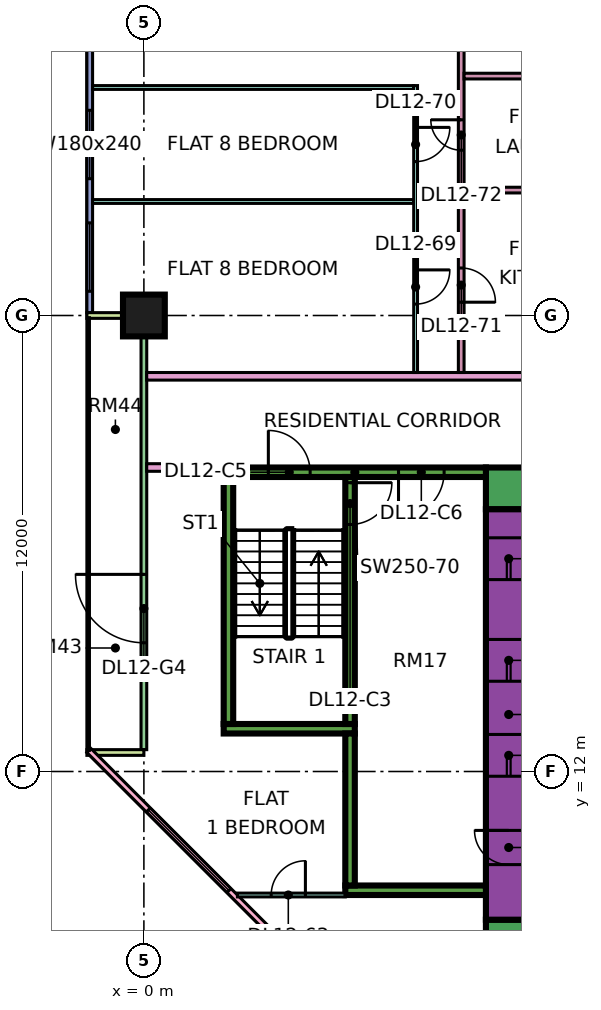
"""IFC4 building model, lengths in metres.
Left out: names, types, materials, properties, quantities, classifications, styles, units other than length and angle.
Written with IfcOpenShell. Run it as: python <this file> out.ifc"""

import sys

from ifc_helpers import new_model, si_unit, direction, frame, frame_2d, origin, origin_2d, place, context, subcontext, project, spatial, rectangle, extrude, element, fill, save


model = new_model("IFC4")
c1 = context("Model", 3, precision=1e-05, world=origin(), true_north=direction((0.0, 1.0)))
c2 = subcontext(c1, "Body", "Model", "MODEL_VIEW")
j1 = project(units=[si_unit("LENGTHUNIT", "METRE"), si_unit("PLANEANGLEUNIT", "RADIAN")], contexts=[c1])
p1 = place(None, origin())
s1 = spatial("IfcSite", under=j1, at=p1, CompositionType="ELEMENT")
p2 = place(p1, origin())
s2 = spatial("IfcBuilding", under=s1, at=p2, CompositionType="ELEMENT")
p3 = place(p2, frame((0.0, 0.0, 60.15)))
s3 = spatial("IfcBuildingStorey", under=s2, at=p3, CompositionType="ELEMENT", Elevation=60.15)
p4 = place(p3, frame((0.0, 24.0, 0.0), z_axis=(0.0, 0.0, 1.0), x_axis=(1.0, 0.0, 0.0)))
e1 = element("IfcColumn", 1, at=p4, inside=s3, PredefinedType="COLUMN", context=c2, shape_type="SweptSolid", body=[
    extrude(rectangle(XDim=1.1, YDim=1.1, at=origin_2d()), origin(), (0.0, 0.0, 1.0), 3.75),
])
p5 = place(p3, frame((9.0, 7.55, 0.0), z_axis=(0.0, 0.0, 1.0), x_axis=(1.0, 0.0, 0.0)))
e2 = element("IfcWall", 2, at=p5, inside=s3, PredefinedType="SHEAR", context=c2, shape_type="SweptSolid", body=[
    extrude(rectangle(XDim=25.0, YDim=1.1, at=frame_2d((12.5, 0.0))), origin(), (0.0, 0.0, 1.0), 3.75),
])
p6 = place(p3, frame((9.0, 19.45, 0.0), z_axis=(0.0, 0.0, 1.0), x_axis=(1.0, 0.0, 0.0)))
e3 = element("IfcWall", 3, at=p6, inside=s3, PredefinedType="SHEAR", context=c2, shape_type="SweptSolid", body=[
    extrude(rectangle(XDim=25.0, YDim=1.1, at=frame_2d((12.5, 0.0))), origin(), (0.0, 0.0, 1.0), 3.75),
])
p7 = place(p6, frame((19.1, 0.0, 0.0)))
e4 = element("IfcOpeningElement", 4, at=p7, cuts=e3, PredefinedType="OPENING", context=c2, shape_type="SweptSolid", body=[
    extrude(rectangle(XDim=1.8, YDim=2.4, at=frame_2d((0.9, 1.2))), frame((0.0, 0.56, 0.0), z_axis=(0.0, -1.0, 0.0), x_axis=(1.0, 0.0, 0.0)), (0.0, 0.0, 1.0), 1.12),
])
p8 = place(p3, frame((9.6, 8.1, 0.0), z_axis=(0.0, 0.0, 1.0), x_axis=(0.0, 1.0, 0.0)))
e5 = element("IfcWall", 5, at=p8, inside=s3, PredefinedType="SHEAR", context=c2, shape_type="SweptSolid", body=[
    extrude(rectangle(XDim=10.8, YDim=1.2, at=frame_2d((5.4, 0.0))), origin(), (0.0, 0.0, 1.0), 3.75),
])
p9 = place(p8, frame((3.775, 0.0, 0.0)))
e6 = element("IfcOpeningElement", 6, at=p9, cuts=e5, PredefinedType="OPENING", context=c2, shape_type="SweptSolid", body=[
    extrude(rectangle(XDim=1.1, YDim=2.2, at=frame_2d((0.55, 1.1))), frame((0.0, 0.61, 0.0), z_axis=(0.0, -1.0, 0.0), x_axis=(1.0, 0.0, 0.0)), (0.0, 0.0, 1.0), 1.22),
])
p10 = place(p8, frame((6.275, 0.0, 0.0)))
e7 = element("IfcOpeningElement", 7, at=p10, cuts=e5, PredefinedType="OPENING", context=c2, shape_type="SweptSolid", body=[
    extrude(rectangle(XDim=1.1, YDim=2.2, at=frame_2d((0.55, 1.1))), frame((0.0, 0.61, 0.0), z_axis=(0.0, -1.0, 0.0), x_axis=(1.0, 0.0, 0.0)), (0.0, 0.0, 1.0), 1.22),
])
p11 = place(p8, frame((8.95, 0.0, 0.0)))
e8 = element("IfcOpeningElement", 8, at=p11, cuts=e5, PredefinedType="OPENING", context=c2, shape_type="SweptSolid", body=[
    extrude(rectangle(XDim=1.1, YDim=2.2, at=frame_2d((0.55, 1.1))), frame((0.0, 0.61, 0.0), z_axis=(0.0, -1.0, 0.0), x_axis=(1.0, 0.0, 0.0)), (0.0, 0.0, 1.0), 1.22),
])
p12 = place(p8, frame((1.45, 0.0, 0.0)))
e9 = element("IfcOpeningElement", 9, at=p12, cuts=e5, PredefinedType="OPENING", context=c2, shape_type="SweptSolid", body=[
    extrude(rectangle(XDim=0.9, YDim=2.1, at=frame_2d((0.45, 1.05))), frame((0.0, 0.61, 0.0), z_axis=(0.0, -1.0, 0.0), x_axis=(1.0, 0.0, 0.0)), (0.0, 0.0, 1.0), 1.22),
])
p13 = place(p3, frame((2.1, 19.875, 0.0), z_axis=(0.0, 0.0, 1.0), x_axis=(1.0, 0.0, 0.0)))
e10 = element("IfcWall", 10, at=p13, inside=s3, PredefinedType="SHEAR", context=c2, shape_type="SweptSolid", body=[
    extrude(rectangle(XDim=6.9, YDim=0.25, at=frame_2d((3.45, 0.0))), origin(), (0.0, 0.0, 1.0), 3.75),
])
p14 = place(p13, frame((1.175, 0.0, 0.0)))
e11 = element("IfcOpeningElement", 11, at=p14, cuts=e10, PredefinedType="OPENING", context=c2, shape_type="SweptSolid", body=[
    extrude(rectangle(XDim=1.1, YDim=2.2, at=frame_2d((0.55, 1.1))), frame((0.0, 0.135, 0.0), z_axis=(0.0, -1.0, 0.0), x_axis=(1.0, 0.0, 0.0)), (0.0, 0.0, 1.0), 0.27),
])
p15 = place(p13, frame((4.6, 0.0, 0.0)))
e12 = element("IfcOpeningElement", 12, at=p15, cuts=e10, PredefinedType="OPENING", context=c2, shape_type="SweptSolid", body=[
    extrude(rectangle(XDim=1.2, YDim=2.2, at=frame_2d((0.6, 1.1))), frame((0.0, 0.135, 0.0), z_axis=(0.0, -1.0, 0.0), x_axis=(1.0, 0.0, 0.0)), (0.0, 0.0, 1.0), 0.27),
])
p16 = place(p3, frame((2.1, 13.125, 0.0), z_axis=(0.0, 0.0, 1.0), x_axis=(1.0, 0.0, 0.0)))
e13 = element("IfcWall", 13, at=p16, inside=s3, PredefinedType="SHEAR", context=c2, shape_type="SweptSolid", body=[
    extrude(rectangle(XDim=3.45, YDim=0.25, at=frame_2d((1.725, 0.0))), origin(), (0.0, 0.0, 1.0), 3.75),
])
p17 = place(p3, frame((2.225, 13.25, 0.0), z_axis=(0.0, 0.0, 1.0), x_axis=(0.0, 1.0, 0.0)))
e14 = element("IfcWall", 14, at=p17, inside=s3, PredefinedType="SHEAR", context=c2, shape_type="SweptSolid", body=[
    extrude(rectangle(XDim=6.5, YDim=0.25, at=frame_2d((3.25, 0.0))), origin(), (0.0, 0.0, 1.0), 3.75),
])
p18 = place(p3, frame((5.425, 13.25, 0.0), z_axis=(0.0, 0.0, 1.0), x_axis=(0.0, 1.0, 0.0)))
e15 = element("IfcWall", 15, at=p18, inside=s3, PredefinedType="SHEAR", context=c2, shape_type="SweptSolid", body=[
    extrude(rectangle(XDim=6.5, YDim=0.25, at=frame_2d((3.25, 0.0))), origin(), (0.0, 0.0, 1.0), 3.75),
])
p19 = place(p18, frame((5.25, 0.0, 0.0)))
e16 = element("IfcOpeningElement", 16, at=p19, cuts=e15, PredefinedType="OPENING", context=c2, shape_type="SweptSolid", body=[
    extrude(rectangle(XDim=1.1, YDim=2.2, at=frame_2d((0.55, 1.1))), frame((0.0, 0.135, 0.0), z_axis=(0.0, -1.0, 0.0), x_axis=(1.0, 0.0, 0.0)), (0.0, 0.0, 1.0), 0.27),
])
p20 = place(p3, frame((5.3, 8.875, 0.0), z_axis=(0.0, 0.0, 1.0), x_axis=(1.0, 0.0, 0.0)))
e17 = element("IfcWall", 17, at=p20, inside=s3, PredefinedType="SHEAR", context=c2, shape_type="SweptSolid", body=[
    extrude(rectangle(XDim=3.7, YDim=0.25, at=frame_2d((1.85, 0.0))), origin(), (0.0, 0.0, 1.0), 3.75),
])
p21 = place(p3, frame((5.425, 9.0, 0.0), z_axis=(0.0, 0.0, 1.0), x_axis=(0.0, 1.0, 0.0)))
e18 = element("IfcWall", 18, at=p21, inside=s3, PredefinedType="SHEAR", context=c2, shape_type="SweptSolid", body=[
    extrude(rectangle(XDim=4.0, YDim=0.25, at=frame_2d((2.0, 0.0))), origin(), (0.0, 0.0, 1.0), 3.75),
])
p22 = place(p3, frame((-1.425, 35.925, 0.0), z_axis=(0.0, 0.0, 1.0), x_axis=(0.0, -1.0, 0.0)))
e19 = element("IfcWall", 19, at=p22, inside=s3, PredefinedType="SOLIDWALL", context=c2, shape_type="SweptSolid", body=[
    extrude(rectangle(XDim=11.85, YDim=0.15, at=frame_2d((5.925, 0.0))), origin(), (0.0, 0.0, 1.0), 3.35),
])
p23 = place(p22, frame((1.462, 0.0, 0.45)))
e20 = element("IfcOpeningElement", 20, at=p23, cuts=e19, PredefinedType="OPENING", context=c2, shape_type="SweptSolid", body=[
    extrude(rectangle(XDim=3.0, YDim=2.4, at=frame_2d((1.5, 1.2))), frame((0.0, 0.085, 0.0), z_axis=(0.0, -1.0, 0.0), x_axis=(1.0, 0.0, 0.0)), (0.0, 0.0, 1.0), 0.17),
])
p24 = place(p22, frame((6.525, 0.0, 0.45)))
e21 = element("IfcOpeningElement", 21, at=p24, cuts=e19, PredefinedType="OPENING", context=c2, shape_type="SweptSolid", body=[
    extrude(rectangle(XDim=1.8, YDim=2.4, at=frame_2d((0.9, 1.2))), frame((0.0, 0.085, 0.0), z_axis=(0.0, -1.0, 0.0), x_axis=(1.0, 0.0, 0.0)), (0.0, 0.0, 1.0), 0.17),
])
p25 = place(p22, frame((9.488, 0.0, 0.45)))
e22 = element("IfcOpeningElement", 22, at=p25, cuts=e19, PredefinedType="OPENING", context=c2, shape_type="SweptSolid", body=[
    extrude(rectangle(XDim=1.8, YDim=2.4, at=frame_2d((0.9, 1.2))), frame((0.0, 0.085, 0.0), z_axis=(0.0, -1.0, 0.0), x_axis=(1.0, 0.0, 0.0)), (0.0, 0.0, 1.0), 0.17),
])
p26 = place(p3, frame((0.0, 23.925, 0.0), z_axis=(0.0, 0.0, 1.0), x_axis=(0.0, -1.0, 0.0)))
e23 = element("IfcWall", 23, at=p26, inside=s3, PredefinedType="SOLIDWALL", context=c2, shape_type="SweptSolid", body=[
    extrude(rectangle(XDim=11.35, YDim=0.15, at=frame_2d((5.675, 0.0))), origin(), (0.0, 0.0, 1.0), 3.35),
])
p27 = place(p26, frame((6.738, 0.0, 0.0)))
e24 = element("IfcOpeningElement", 24, at=p27, cuts=e23, PredefinedType="OPENING", context=c2, shape_type="SweptSolid", body=[
    extrude(rectangle(XDim=1.8, YDim=2.4, at=frame_2d((0.9, 1.2))), frame((0.0, 0.085, 0.0), z_axis=(0.0, -1.0, 0.0), x_axis=(1.0, 0.0, 0.0)), (0.0, 0.0, 1.0), 0.17),
])
for number, where, z_axis, x_axis in (
    (25, (-1.5, 24.0, 0.0), (0.0, 0.0, 1.0), (1.0, 0.0, 0.0)),
    (26, (-1.5, 12.5, 0.0), (0.0, 0.0, 1.0), (1.0, 0.0, 0.0)),
):
    element("IfcWall", number, at=place(p3, frame(where, z_axis=z_axis, x_axis=x_axis)), inside=s3, PredefinedType="SOLIDWALL", context=c2, shape_type="SweptSolid", body=[
        extrude(rectangle(XDim=1.5, YDim=0.15, at=frame_2d((0.75, 0.0))), origin(), (0.0, 0.0, 1.0), 3.35),
    ])
p28 = place(p3, frame((-1.447, 12.553, 0.0), z_axis=(0.0, 0.0, 1.0), x_axis=(0.707106781187, -0.707106781187, 0.0)))
e27 = element("IfcWall", 27, at=p28, inside=s3, PredefinedType="SOLIDWALL", context=c2, shape_type="SweptSolid", body=[
    extrude(rectangle(XDim=19.799, YDim=0.15, at=frame_2d((9.899, 0.0))), origin(), (0.0, 0.0, 1.0), 3.35),
])
p29 = place(p28, frame((2.212, 0.0, 0.45)))
e28 = element("IfcOpeningElement", 28, at=p29, cuts=e27, PredefinedType="OPENING", context=c2, shape_type="SweptSolid", body=[
    extrude(rectangle(XDim=3.0, YDim=2.4, at=frame_2d((1.5, 1.2))), frame((0.0, 0.085, 0.0), z_axis=(0.0, -1.0, 0.0), x_axis=(1.0, 0.0, 0.0)), (0.0, 0.0, 1.0), 0.17),
])
p30 = place(p28, frame((10.216, 0.0, 0.45)))
e29 = element("IfcOpeningElement", 29, at=p30, cuts=e27, PredefinedType="OPENING", context=c2, shape_type="SweptSolid", body=[
    extrude(rectangle(XDim=3.0, YDim=2.4, at=frame_2d((1.5, 1.2))), frame((0.0, 0.085, 0.0), z_axis=(0.0, -1.0, 0.0), x_axis=(1.0, 0.0, 0.0)), (0.0, 0.0, 1.0), 0.17),
])
p31 = place(p3, frame((-1.351, 27.0, 0.0), z_axis=(0.0, 0.0, 1.0), x_axis=(1.0, 0.0, 0.0)))
e30 = element("IfcWall", 30, at=p31, inside=s3, PredefinedType="PARTITIONING", context=c2, shape_type="SweptSolid", body=[
    extrude(rectangle(XDim=8.451, YDim=0.1, at=frame_2d((4.226, 0.0))), origin(), (0.0, 0.0, 1.0), 3.35),
])
p32 = place(p3, frame((-1.35, 30.0, 0.0), z_axis=(0.0, 0.0, 1.0), x_axis=(1.0, 0.0, 0.0)))
e31 = element("IfcWall", 31, at=p32, inside=s3, PredefinedType="PARTITIONING", context=c2, shape_type="SweptSolid", body=[
    extrude(rectangle(XDim=8.45, YDim=0.1, at=frame_2d((4.225, 0.0))), origin(), (0.0, 0.0, 1.0), 3.35),
])
p33 = place(p3, frame((0.074, 20.0, 0.0), z_axis=(0.0, 0.0, 1.0), x_axis=(1.0, 0.0, 0.0)))
e32 = element("IfcWall", 32, at=p33, inside=s3, PredefinedType="PARTITIONING", context=c2, shape_type="SweptSolid", body=[
    extrude(rectangle(XDim=2.026, YDim=0.2, at=frame_2d((1.013, 0.0))), origin(), (0.0, 0.0, 1.0), 3.35),
])
p34 = place(p3, frame((0.074, 22.4, 0.0), z_axis=(0.0, 0.0, 1.0), x_axis=(1.0, 0.0, 0.0)))
e33 = element("IfcWall", 33, at=p34, inside=s3, PredefinedType="PARTITIONING", context=c2, shape_type="SweptSolid", body=[
    extrude(rectangle(XDim=12.376, YDim=0.2, at=frame_2d((6.188, 0.0))), origin(), (0.0, 0.0, 1.0), 3.35),
])
p35 = place(p3, frame((2.461, 8.75, 0.0), z_axis=(0.0, 0.0, 1.0), x_axis=(1.0, 0.0, 0.0)))
e34 = element("IfcWall", 34, at=p35, inside=s3, PredefinedType="PARTITIONING", context=c2, shape_type="SweptSolid", body=[
    extrude(rectangle(XDim=2.839, YDim=0.1, at=frame_2d((1.419, 0.0))), origin(), (0.0, 0.0, 1.0), 3.35),
])
p36 = place(p35, frame((0.889, 0.0, 0.0)))
e35 = element("IfcOpeningElement", 35, at=p36, cuts=e34, PredefinedType="OPENING", context=c2, shape_type="SweptSolid", body=[
    extrude(rectangle(XDim=0.9, YDim=2.1, at=frame_2d((0.45, 1.05))), frame((0.0, 0.06, 0.0), z_axis=(0.0, -1.0, 0.0), x_axis=(1.0, 0.0, 0.0)), (0.0, 0.0, 1.0), 0.12),
])
p37 = place(p3, frame((7.15, 22.5, 0.0), z_axis=(0.0, 0.0, 1.0), x_axis=(0.0, 1.0, 0.0)))
e36 = element("IfcWall", 36, at=p37, inside=s3, PredefinedType="PARTITIONING", context=c2, shape_type="SweptSolid", body=[
    extrude(rectangle(XDim=7.55, YDim=0.1, at=frame_2d((3.775, 0.0))), origin(), (0.0, 0.0, 1.0), 3.35),
])
p38 = place(p37, frame((1.8, 0.0, 0.0)))
e37 = element("IfcOpeningElement", 37, at=p38, cuts=e36, PredefinedType="OPENING", context=c2, shape_type="SweptSolid", body=[
    extrude(rectangle(XDim=0.9, YDim=2.1, at=frame_2d((0.45, 1.05))), frame((0.0, 0.06, 0.0), z_axis=(0.0, -1.0, 0.0), x_axis=(1.0, 0.0, 0.0)), (0.0, 0.0, 1.0), 0.12),
])
p39 = place(p37, frame((5.55, 0.0, 0.0)))
e38 = element("IfcOpeningElement", 38, at=p39, cuts=e36, PredefinedType="OPENING", context=c2, shape_type="SweptSolid", body=[
    extrude(rectangle(XDim=0.9, YDim=2.1, at=frame_2d((0.45, 1.05))), frame((0.0, 0.06, 0.0), z_axis=(0.0, -1.0, 0.0), x_axis=(1.0, 0.0, 0.0)), (0.0, 0.0, 1.0), 0.12),
])
p40 = place(p3, frame((8.35, 22.5, 0.0), z_axis=(0.0, 0.0, 1.0), x_axis=(0.0, 1.0, 0.0)))
e39 = element("IfcWall", 39, at=p40, inside=s3, PredefinedType="PARTITIONING", context=c2, shape_type="SweptSolid", body=[
    extrude(rectangle(XDim=10.875, YDim=0.15, at=frame_2d((5.438, 0.0))), origin(), (0.0, 0.0, 1.0), 3.35),
])
p41 = place(p40, frame((8.85, 0.0, 0.0)))
e40 = element("IfcOpeningElement", 40, at=p41, cuts=e39, PredefinedType="OPENING", context=c2, shape_type="SweptSolid", body=[
    extrude(rectangle(XDim=0.8, YDim=2.1, at=frame_2d((0.4, 1.05))), frame((0.0, 0.085, 0.0), z_axis=(0.0, -1.0, 0.0), x_axis=(1.0, 0.0, 0.0)), (0.0, 0.0, 1.0), 0.17),
])
p42 = place(p40, frame((1.85, 0.0, 0.0)))
e41 = element("IfcOpeningElement", 41, at=p42, cuts=e39, PredefinedType="OPENING", context=c2, shape_type="SweptSolid", body=[
    extrude(rectangle(XDim=0.9, YDim=2.1, at=frame_2d((0.45, 1.05))), frame((0.0, 0.085, 0.0), z_axis=(0.0, -1.0, 0.0), x_axis=(1.0, 0.0, 0.0)), (0.0, 0.0, 1.0), 0.17),
])
p43 = place(p40, frame((5.85, 0.0, 0.0)))
e42 = element("IfcOpeningElement", 42, at=p43, cuts=e39, PredefinedType="OPENING", context=c2, shape_type="SweptSolid", body=[
    extrude(rectangle(XDim=0.8, YDim=2.1, at=frame_2d((0.4, 1.05))), frame((0.0, 0.085, 0.0), z_axis=(0.0, -1.0, 0.0), x_axis=(1.0, 0.0, 0.0)), (0.0, 0.0, 1.0), 0.17),
])
for number, where, z_axis, x_axis in (
    (43, (8.425, 27.3, 0.0), (0.0, 0.0, 1.0), (1.0, 0.0, 0.0)),
    (44, (8.425, 30.3, 0.0), (0.0, 0.0, 1.0), (1.0, 0.0, 0.0)),
):
    element("IfcWall", number, at=place(p3, frame(where, z_axis=z_axis, x_axis=x_axis)), inside=s3, PredefinedType="PARTITIONING", context=c2, shape_type="SweptSolid", body=[
        extrude(rectangle(XDim=4.025, YDim=0.15, at=frame_2d((2.012, 0.0))), origin(), (0.0, 0.0, 1.0), 3.35),
    ])
p44 = place(p24, origin())
e45 = element("IfcWindow", 45, at=p44, inside=s3, PartitioningType="SINGLE_PANEL", PredefinedType="WINDOW", context=c2, shape_type="SweptSolid", body=[
    extrude(rectangle(XDim=1.8, YDim=2.4, at=frame_2d((0.9, 1.2))), frame((0.0, 0.03, 0.0), z_axis=(0.0, -1.0, 0.0), x_axis=(1.0, 0.0, 0.0)), (0.0, 0.0, 1.0), 0.06),
])
fill(e21, e45)
p45 = place(p25, origin())
e46 = element("IfcWindow", 46, at=p45, inside=s3, PartitioningType="SINGLE_PANEL", PredefinedType="WINDOW", context=c2, shape_type="SweptSolid", body=[
    extrude(rectangle(XDim=1.8, YDim=2.4, at=frame_2d((0.9, 1.2))), frame((0.0, 0.03, 0.0), z_axis=(0.0, -1.0, 0.0), x_axis=(1.0, 0.0, 0.0)), (0.0, 0.0, 1.0), 0.06),
])
fill(e22, e46)
p46 = place(p27, frame((1.8, 0.0, 0.0), z_axis=(0.0, 0.0, 1.0), x_axis=(-1.0, 0.0, 0.0)))
e47 = element("IfcDoor", 47, at=p46, inside=s3, OperationType="DOUBLE_DOOR_SINGLE_SWING", PredefinedType="DOOR", context=c2, shape_type="SweptSolid", body=[
    extrude(rectangle(XDim=1.8, YDim=2.4, at=frame_2d((0.9, 1.2))), frame((0.0, 0.025, 0.0), z_axis=(0.0, -1.0, 0.0), x_axis=(1.0, 0.0, 0.0)), (0.0, 0.0, 1.0), 0.05),
])
fill(e24, e47)
p47 = place(p29, origin())
e48 = element("IfcWindow", 48, at=p47, inside=s3, PartitioningType="SINGLE_PANEL", PredefinedType="WINDOW", context=c2, shape_type="SweptSolid", body=[
    extrude(rectangle(XDim=3.0, YDim=2.4, at=frame_2d((1.5, 1.2))), frame((0.0, 0.03, 0.0), z_axis=(0.0, -1.0, 0.0), x_axis=(1.0, 0.0, 0.0)), (0.0, 0.0, 1.0), 0.06),
])
fill(e28, e48)
p48 = place(p9, origin())
e49 = element("IfcDoor", 49, at=p48, inside=s3, OperationType="DOUBLE_DOOR_SLIDING", PredefinedType="DOOR", context=c2, shape_type="SweptSolid", body=[
    extrude(rectangle(XDim=1.1, YDim=2.2, at=frame_2d((0.55, 1.1))), frame((0.0, 0.025, 0.0), z_axis=(0.0, -1.0, 0.0), x_axis=(1.0, 0.0, 0.0)), (0.0, 0.0, 1.0), 0.05),
])
fill(e6, e49)
p49 = place(p10, origin())
e50 = element("IfcDoor", 50, at=p49, inside=s3, OperationType="DOUBLE_DOOR_SLIDING", PredefinedType="DOOR", context=c2, shape_type="SweptSolid", body=[
    extrude(rectangle(XDim=1.1, YDim=2.2, at=frame_2d((0.55, 1.1))), frame((0.0, 0.025, 0.0), z_axis=(0.0, -1.0, 0.0), x_axis=(1.0, 0.0, 0.0)), (0.0, 0.0, 1.0), 0.05),
])
fill(e7, e50)
p50 = place(p11, origin())
e51 = element("IfcDoor", 51, at=p50, inside=s3, OperationType="DOUBLE_DOOR_SLIDING", PredefinedType="DOOR", context=c2, shape_type="SweptSolid", body=[
    extrude(rectangle(XDim=1.1, YDim=2.2, at=frame_2d((0.55, 1.1))), frame((0.0, 0.025, 0.0), z_axis=(0.0, -1.0, 0.0), x_axis=(1.0, 0.0, 0.0)), (0.0, 0.0, 1.0), 0.05),
])
fill(e8, e51)
p51 = place(p19, origin())
e52 = element("IfcDoor", 52, at=p51, inside=s3, OperationType="SINGLE_SWING_RIGHT", PredefinedType="DOOR", context=c2, shape_type="SweptSolid", body=[
    extrude(rectangle(XDim=1.1, YDim=2.2, at=frame_2d((0.55, 1.1))), frame((0.0, 0.025, 0.0), z_axis=(0.0, -1.0, 0.0), x_axis=(1.0, 0.0, 0.0)), (0.0, 0.0, 1.0), 0.05),
])
fill(e16, e52)
p52 = place(p12, frame((0.9, 0.0, 0.0), z_axis=(0.0, 0.0, 1.0), x_axis=(-1.0, 0.0, 0.0)))
e53 = element("IfcDoor", 53, at=p52, inside=s3, OperationType="SINGLE_SWING_RIGHT", PredefinedType="DOOR", context=c2, shape_type="SweptSolid", body=[
    extrude(rectangle(XDim=0.9, YDim=2.1, at=frame_2d((0.45, 1.05))), frame((0.0, 0.025, 0.0), z_axis=(0.0, -1.0, 0.0), x_axis=(1.0, 0.0, 0.0)), (0.0, 0.0, 1.0), 0.05),
])
fill(e9, e53)
p53 = place(p14, origin())
e54 = element("IfcDoor", 54, at=p53, inside=s3, OperationType="SINGLE_SWING_LEFT", PredefinedType="DOOR", context=c2, shape_type="SweptSolid", body=[
    extrude(rectangle(XDim=1.1, YDim=2.2, at=frame_2d((0.55, 1.1))), frame((0.0, 0.025, 0.0), z_axis=(0.0, -1.0, 0.0), x_axis=(1.0, 0.0, 0.0)), (0.0, 0.0, 1.0), 0.05),
])
fill(e11, e54)
p54 = place(p15, frame((1.2, 0.0, 0.0), z_axis=(0.0, 0.0, 1.0), x_axis=(-1.0, 0.0, 0.0)))
e55 = element("IfcDoor", 55, at=p54, inside=s3, OperationType="SINGLE_SWING_LEFT", PredefinedType="DOOR", context=c2, shape_type="SweptSolid", body=[
    extrude(rectangle(XDim=1.2, YDim=2.2, at=frame_2d((0.6, 1.1))), frame((0.0, 0.025, 0.0), z_axis=(0.0, -1.0, 0.0), x_axis=(1.0, 0.0, 0.0)), (0.0, 0.0, 1.0), 0.05),
])
fill(e12, e55)
p55 = place(p36, frame((0.9, 0.0, 0.0), z_axis=(0.0, 0.0, 1.0), x_axis=(-1.0, 0.0, 0.0)))
e56 = element("IfcDoor", 56, at=p55, inside=s3, OperationType="SINGLE_SWING_RIGHT", PredefinedType="DOOR", context=c2, shape_type="SweptSolid", body=[
    extrude(rectangle(XDim=0.9, YDim=2.1, at=frame_2d((0.45, 1.05))), frame((0.0, 0.025, 0.0), z_axis=(0.0, -1.0, 0.0), x_axis=(1.0, 0.0, 0.0)), (0.0, 0.0, 1.0), 0.05),
])
fill(e35, e56)
p56 = place(p38, origin())
e57 = element("IfcDoor", 57, at=p56, inside=s3, OperationType="SINGLE_SWING_RIGHT", PredefinedType="DOOR", context=c2, shape_type="SweptSolid", body=[
    extrude(rectangle(XDim=0.9, YDim=2.1, at=frame_2d((0.45, 1.05))), frame((0.0, 0.025, 0.0), z_axis=(0.0, -1.0, 0.0), x_axis=(1.0, 0.0, 0.0)), (0.0, 0.0, 1.0), 0.05),
])
fill(e37, e57)
p57 = place(p39, origin())
e58 = element("IfcDoor", 58, at=p57, inside=s3, OperationType="SINGLE_SWING_RIGHT", PredefinedType="DOOR", context=c2, shape_type="SweptSolid", body=[
    extrude(rectangle(XDim=0.9, YDim=2.1, at=frame_2d((0.45, 1.05))), frame((0.0, 0.025, 0.0), z_axis=(0.0, -1.0, 0.0), x_axis=(1.0, 0.0, 0.0)), (0.0, 0.0, 1.0), 0.05),
])
fill(e38, e58)
p58 = place(p42, frame((0.9, 0.0, 0.0), z_axis=(0.0, 0.0, 1.0), x_axis=(-1.0, 0.0, 0.0)))
e59 = element("IfcDoor", 59, at=p58, inside=s3, OperationType="SINGLE_SWING_LEFT", PredefinedType="DOOR", context=c2, shape_type="SweptSolid", body=[
    extrude(rectangle(XDim=0.9, YDim=2.1, at=frame_2d((0.45, 1.05))), frame((0.0, 0.025, 0.0), z_axis=(0.0, -1.0, 0.0), x_axis=(1.0, 0.0, 0.0)), (0.0, 0.0, 1.0), 0.05),
])
fill(e41, e59)
p59 = place(p43, frame((0.8, 0.0, 0.0), z_axis=(0.0, 0.0, 1.0), x_axis=(-1.0, 0.0, 0.0)))
e60 = element("IfcDoor", 60, at=p59, inside=s3, OperationType="SINGLE_SWING_RIGHT", PredefinedType="DOOR", context=c2, shape_type="SweptSolid", body=[
    extrude(rectangle(XDim=0.8, YDim=2.1, at=frame_2d((0.4, 1.05))), frame((0.0, 0.025, 0.0), z_axis=(0.0, -1.0, 0.0), x_axis=(1.0, 0.0, 0.0)), (0.0, 0.0, 1.0), 0.05),
])
fill(e42, e60)
save(model, sys.argv[1])
